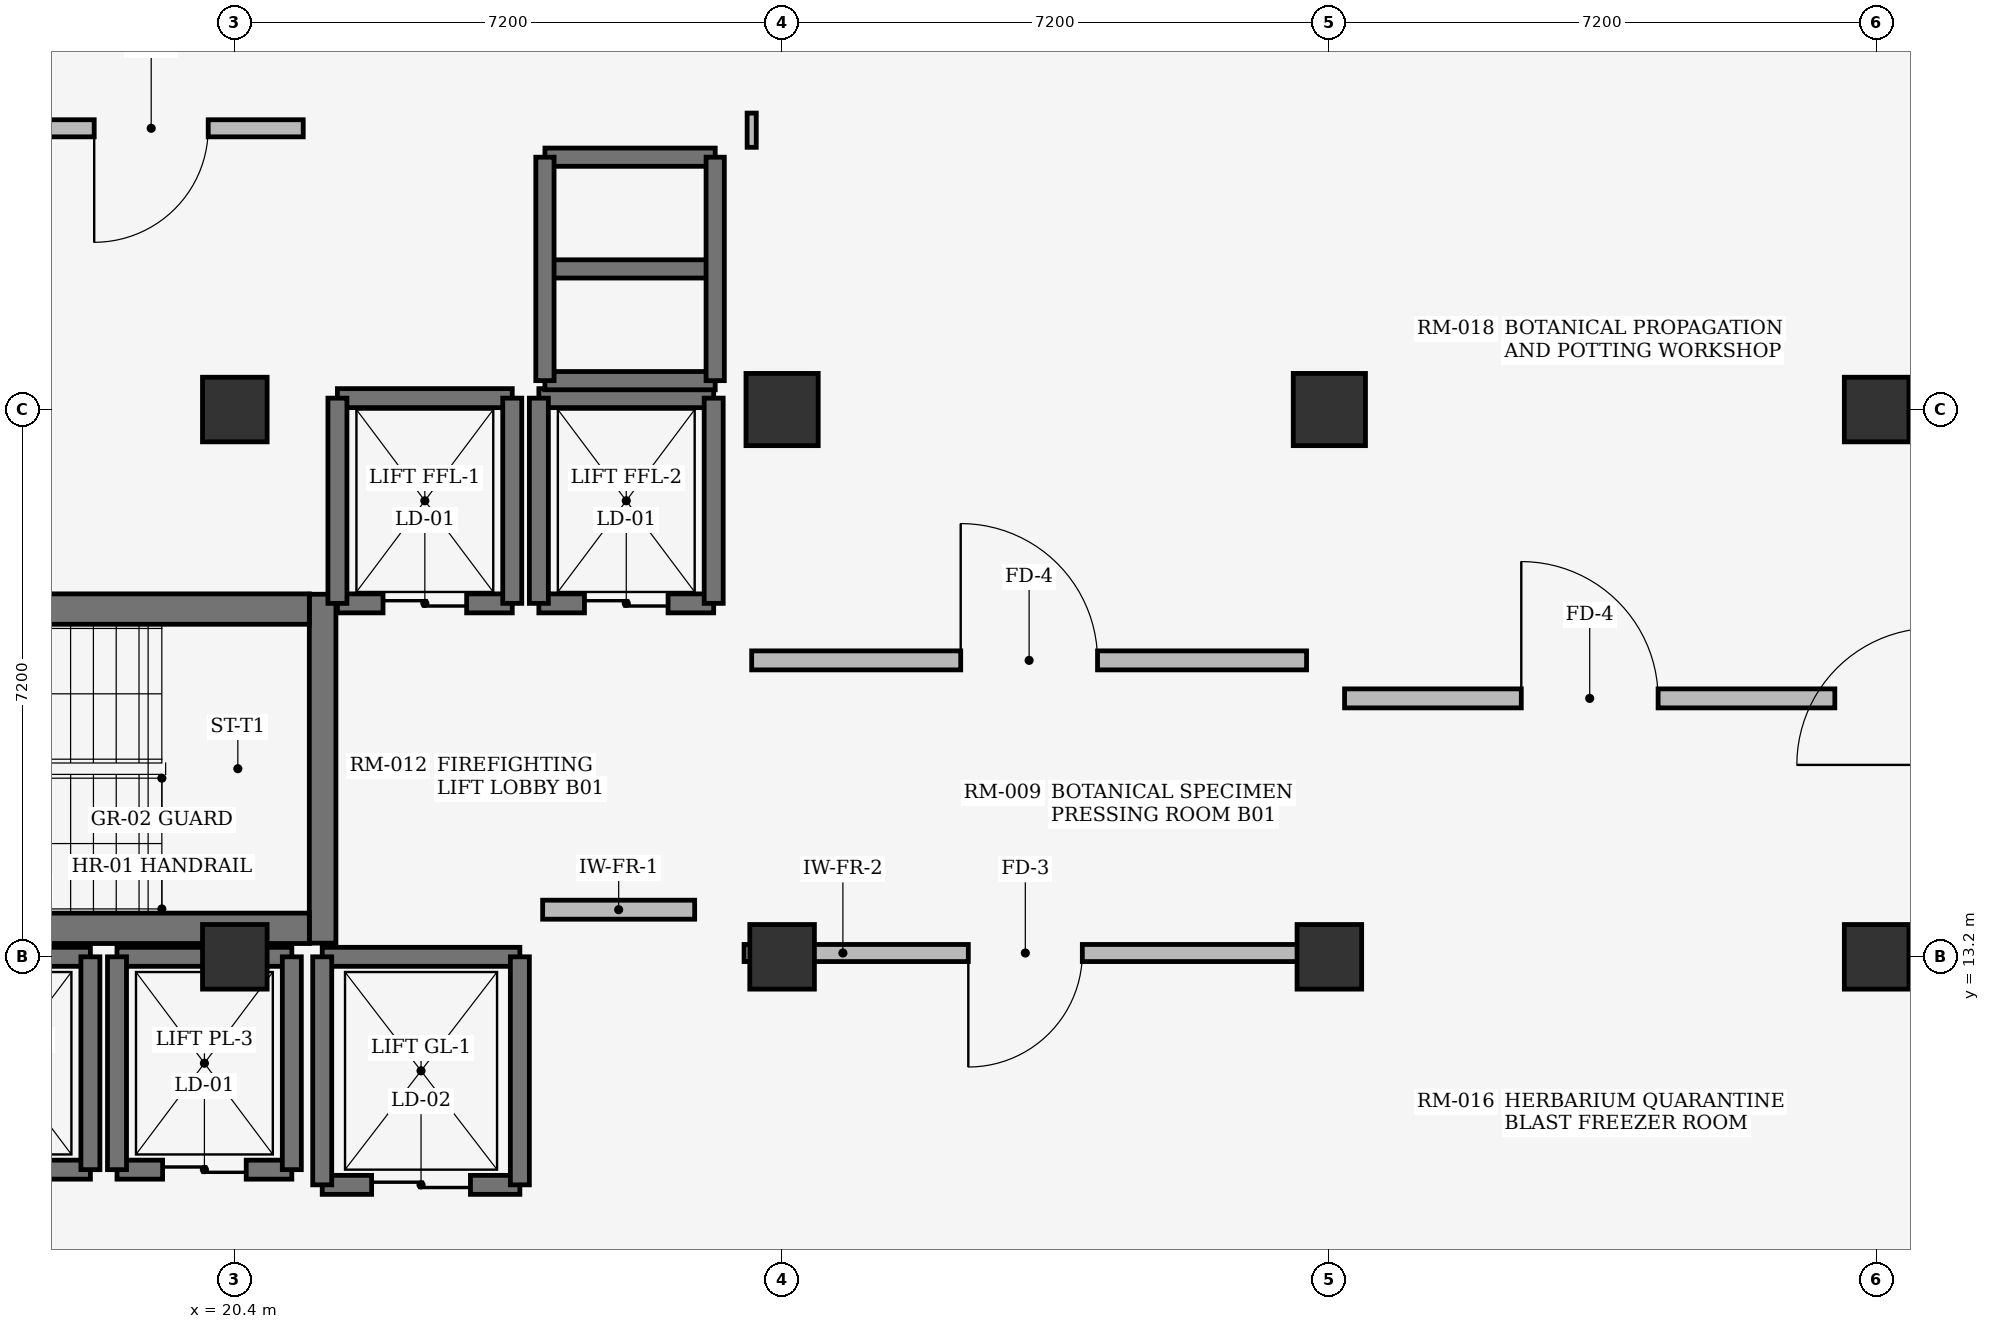
"""IFC4 building model, lengths in metres.
Left out: names, types, materials, properties, quantities, classifications, styles, units other than length and angle.
Written with IfcOpenShell. Run it as: python <this file> out.ifc"""

import sys

from ifc_helpers import new_model, si_unit, direction, frame, frame_2d, origin, origin_2d, place, context, subcontext, project, spatial, rectangle, extrude, element, fill, save


model = new_model("IFC4")
c1 = context("Model", 3, precision=1e-05, world=origin(), true_north=direction((0.0, 1.0)))
c2 = subcontext(c1, "Body", "Model", "MODEL_VIEW")
j1 = project(units=[si_unit("LENGTHUNIT", "METRE"), si_unit("PLANEANGLEUNIT", "RADIAN")], contexts=[c1])
p1 = place(None, origin())
s1 = spatial("IfcSite", under=j1, at=p1, CompositionType="ELEMENT")
p2 = place(p1, origin())
s2 = spatial("IfcBuilding", under=s1, at=p2, CompositionType="ELEMENT")
p3 = place(p2, frame((0.0, 0.0, -4.8)))
s3 = spatial("IfcBuildingStorey", under=s2, at=p3, CompositionType="ELEMENT", Elevation=-4.8)
for number, where, z_axis, x_axis in (
    (1, (20.4, 13.2, 0.0), (0.0, 0.0, 1.0), (1.0, 0.0, 0.0)),
    (2, (20.4, 20.4, 0.0), (0.0, 0.0, 1.0), (1.0, 0.0, 0.0)),
    (3, (27.6, 13.2, 0.0), (0.0, 0.0, 1.0), (1.0, 0.0, 0.0)),
):
    element("IfcColumn", number, at=place(p3, frame(where, z_axis=z_axis, x_axis=x_axis)), inside=s3, PredefinedType="COLUMN", context=c2, shape_type="SweptSolid", body=[
        extrude(rectangle(XDim=0.85, YDim=0.85, at=origin_2d()), origin(), (0.0, 0.0, 1.0), 4.5),
    ])
p4 = place(p3, frame((27.6, 20.4, 0.0), z_axis=(0.0, 0.0, 1.0), x_axis=(1.0, 0.0, 0.0)))
e4 = element("IfcColumn", 4, at=p4, inside=s3, PredefinedType="COLUMN", context=c2, shape_type="SweptSolid", body=[
    extrude(rectangle(XDim=0.95, YDim=0.95, at=origin_2d()), origin(), (0.0, 0.0, 1.0), 4.5),
])
p5 = place(p3, frame((34.8, 13.2, 0.0), z_axis=(0.0, 0.0, 1.0), x_axis=(1.0, 0.0, 0.0)))
e5 = element("IfcColumn", 5, at=p5, inside=s3, PredefinedType="COLUMN", context=c2, shape_type="SweptSolid", body=[
    extrude(rectangle(XDim=0.85, YDim=0.85, at=origin_2d()), origin(), (0.0, 0.0, 1.0), 4.5),
])
p6 = place(p3, frame((34.8, 20.4, 0.0), z_axis=(0.0, 0.0, 1.0), x_axis=(1.0, 0.0, 0.0)))
e6 = element("IfcColumn", 6, at=p6, inside=s3, PredefinedType="COLUMN", context=c2, shape_type="SweptSolid", body=[
    extrude(rectangle(XDim=0.95, YDim=0.95, at=origin_2d()), origin(), (0.0, 0.0, 1.0), 4.5),
])
for number, where, z_axis, x_axis in (
    (7, (42.0, 13.2, 0.0), (0.0, 0.0, 1.0), (1.0, 0.0, 0.0)),
    (8, (42.0, 20.4, 0.0), (0.0, 0.0, 1.0), (1.0, 0.0, 0.0)),
):
    element("IfcColumn", number, at=place(p3, frame(where, z_axis=z_axis, x_axis=x_axis)), inside=s3, PredefinedType="COLUMN", context=c2, shape_type="SweptSolid", body=[
        extrude(rectangle(XDim=0.85, YDim=0.85, at=origin_2d()), origin(), (0.0, 0.0, 1.0), 4.5),
    ])
p7 = place(p3, frame((21.555, 13.38, 0.0), z_axis=(0.0, 0.0, 1.0), x_axis=(0.0, 1.0, 0.0)))
e9 = element("IfcWall", 9, at=p7, inside=s3, PredefinedType="SHEAR", context=c2, shape_type="SweptSolid", body=[
    extrude(rectangle(XDim=4.59, YDim=0.35, at=frame_2d((2.295, 0.0))), origin(), (0.0, 0.0, 1.0), 4.5),
])
for number, where, z_axis, x_axis in (
    (10, (13.4, 13.575, 0.0), (0.0, 0.0, 1.0), (1.0, 0.0, 0.0)),
    (11, (13.4, 17.775, 0.0), (0.0, 0.0, 1.0), (1.0, 0.0, 0.0)),
):
    element("IfcWall", number, at=place(p3, frame(where, z_axis=z_axis, x_axis=x_axis)), inside=s3, PredefinedType="SHEAR", context=c2, shape_type="SweptSolid", body=[
        extrude(rectangle(XDim=7.98, YDim=0.4, at=frame_2d((3.99, 0.0))), origin(), (0.0, 0.0, 1.0), 4.5),
    ])
p8 = place(p3, frame((21.75, 17.85, 0.0), z_axis=(0.0, 0.0, 1.0), x_axis=(1.0, 0.0, 0.0)))
e12 = element("IfcWall", 12, at=p8, inside=s3, PredefinedType="SHEAR", context=c2, shape_type="SweptSolid", body=[
    extrude(rectangle(XDim=2.3, YDim=0.25, at=frame_2d((1.15, 0.0))), origin(), (0.0, 0.0, 1.0), 4.5),
])
p9 = place(p8, frame((0.6, 0.0, 0.0)))
e13 = element("IfcOpeningElement", 13, at=p9, cuts=e12, PredefinedType="OPENING", context=c2, shape_type="SweptSolid", body=[
    extrude(rectangle(XDim=1.1, YDim=2.2, at=frame_2d((0.55, 1.1))), frame((0.0, 0.135, 0.0), z_axis=(0.0, -1.0, 0.0), x_axis=(1.0, 0.0, 0.0)), (0.0, 0.0, 1.0), 0.27),
])
p10 = place(p3, frame((21.75, 20.55, 0.0), z_axis=(0.0, 0.0, 1.0), x_axis=(1.0, 0.0, 0.0)))
e14 = element("IfcWall", 14, at=p10, inside=s3, PredefinedType="SHEAR", context=c2, shape_type="SweptSolid", body=[
    extrude(rectangle(XDim=2.3, YDim=0.25, at=frame_2d((1.15, 0.0))), origin(), (0.0, 0.0, 1.0), 4.5),
])
for number, where, z_axis, x_axis in (
    (15, (21.75, 17.85, 0.0), (0.0, 0.0, 1.0), (0.0, 1.0, 0.0)),
    (16, (24.05, 17.85, 0.0), (0.0, 0.0, 1.0), (0.0, 1.0, 0.0)),
):
    element("IfcWall", number, at=place(p3, frame(where, z_axis=z_axis, x_axis=x_axis)), inside=s3, PredefinedType="SHEAR", context=c2, shape_type="SweptSolid", body=[
        extrude(rectangle(XDim=2.7, YDim=0.25, at=frame_2d((1.35, 0.0))), origin(), (0.0, 0.0, 1.0), 4.5),
    ])
p11 = place(p3, frame((24.4, 17.85, 0.0), z_axis=(0.0, 0.0, 1.0), x_axis=(1.0, 0.0, 0.0)))
e17 = element("IfcWall", 17, at=p11, inside=s3, PredefinedType="SHEAR", context=c2, shape_type="SweptSolid", body=[
    extrude(rectangle(XDim=2.3, YDim=0.25, at=frame_2d((1.15, 0.0))), origin(), (0.0, 0.0, 1.0), 4.5),
])
p12 = place(p11, frame((0.6, 0.0, 0.0)))
e18 = element("IfcOpeningElement", 18, at=p12, cuts=e17, PredefinedType="OPENING", context=c2, shape_type="SweptSolid", body=[
    extrude(rectangle(XDim=1.1, YDim=2.2, at=frame_2d((0.55, 1.1))), frame((0.0, 0.135, 0.0), z_axis=(0.0, -1.0, 0.0), x_axis=(1.0, 0.0, 0.0)), (0.0, 0.0, 1.0), 0.27),
])
p13 = place(p3, frame((24.4, 20.55, 0.0), z_axis=(0.0, 0.0, 1.0), x_axis=(1.0, 0.0, 0.0)))
e19 = element("IfcWall", 19, at=p13, inside=s3, PredefinedType="SHEAR", context=c2, shape_type="SweptSolid", body=[
    extrude(rectangle(XDim=2.3, YDim=0.25, at=frame_2d((1.15, 0.0))), origin(), (0.0, 0.0, 1.0), 4.5),
])
for number, where, z_axis, x_axis in (
    (20, (24.4, 17.85, 0.0), (0.0, 0.0, 1.0), (0.0, 1.0, 0.0)),
    (21, (26.7, 17.85, 0.0), (0.0, 0.0, 1.0), (0.0, 1.0, 0.0)),
):
    element("IfcWall", number, at=place(p3, frame(where, z_axis=z_axis, x_axis=x_axis)), inside=s3, PredefinedType="SHEAR", context=c2, shape_type="SweptSolid", body=[
        extrude(rectangle(XDim=2.7, YDim=0.25, at=frame_2d((1.35, 0.0))), origin(), (0.0, 0.0, 1.0), 4.5),
    ])
p14 = place(p3, frame((16.2, 10.4, 0.0), z_axis=(0.0, 0.0, 1.0), x_axis=(1.0, 0.0, 0.0)))
e22 = element("IfcWall", 22, at=p14, inside=s3, PredefinedType="SHEAR", context=c2, shape_type="SweptSolid", body=[
    extrude(rectangle(XDim=2.3, YDim=0.25, at=frame_2d((1.15, 0.0))), origin(), (0.0, 0.0, 1.0), 4.5),
])
p15 = place(p14, frame((0.6, 0.0, 0.0)))
e23 = element("IfcOpeningElement", 23, at=p15, cuts=e22, PredefinedType="OPENING", context=c2, shape_type="SweptSolid", body=[
    extrude(rectangle(XDim=1.1, YDim=2.2, at=frame_2d((0.55, 1.1))), frame((0.0, 0.135, 0.0), z_axis=(0.0, -1.0, 0.0), x_axis=(1.0, 0.0, 0.0)), (0.0, 0.0, 1.0), 0.27),
])
p16 = place(p3, frame((16.2, 13.2, 0.0), z_axis=(0.0, 0.0, 1.0), x_axis=(1.0, 0.0, 0.0)))
e24 = element("IfcWall", 24, at=p16, inside=s3, PredefinedType="SHEAR", context=c2, shape_type="SweptSolid", body=[
    extrude(rectangle(XDim=2.3, YDim=0.25, at=frame_2d((1.15, 0.0))), origin(), (0.0, 0.0, 1.0), 4.5),
])
p17 = place(p3, frame((18.5, 10.4, 0.0), z_axis=(0.0, 0.0, 1.0), x_axis=(0.0, 1.0, 0.0)))
e25 = element("IfcWall", 25, at=p17, inside=s3, PredefinedType="SHEAR", context=c2, shape_type="SweptSolid", body=[
    extrude(rectangle(XDim=2.8, YDim=0.25, at=frame_2d((1.4, 0.0))), origin(), (0.0, 0.0, 1.0), 4.5),
])
p18 = place(p3, frame((18.85, 10.4, 0.0), z_axis=(0.0, 0.0, 1.0), x_axis=(1.0, 0.0, 0.0)))
e26 = element("IfcWall", 26, at=p18, inside=s3, PredefinedType="SHEAR", context=c2, shape_type="SweptSolid", body=[
    extrude(rectangle(XDim=2.3, YDim=0.25, at=frame_2d((1.15, 0.0))), origin(), (0.0, 0.0, 1.0), 4.5),
])
p19 = place(p18, frame((0.6, 0.0, 0.0)))
e27 = element("IfcOpeningElement", 27, at=p19, cuts=e26, PredefinedType="OPENING", context=c2, shape_type="SweptSolid", body=[
    extrude(rectangle(XDim=1.1, YDim=2.2, at=frame_2d((0.55, 1.1))), frame((0.0, 0.135, 0.0), z_axis=(0.0, -1.0, 0.0), x_axis=(1.0, 0.0, 0.0)), (0.0, 0.0, 1.0), 0.27),
])
p20 = place(p3, frame((18.85, 13.2, 0.0), z_axis=(0.0, 0.0, 1.0), x_axis=(1.0, 0.0, 0.0)))
e28 = element("IfcWall", 28, at=p20, inside=s3, PredefinedType="SHEAR", context=c2, shape_type="SweptSolid", body=[
    extrude(rectangle(XDim=2.3, YDim=0.25, at=frame_2d((1.15, 0.0))), origin(), (0.0, 0.0, 1.0), 4.5),
])
for number, where, z_axis, x_axis in (
    (29, (18.85, 10.4, 0.0), (0.0, 0.0, 1.0), (0.0, 1.0, 0.0)),
    (30, (21.15, 10.4, 0.0), (0.0, 0.0, 1.0), (0.0, 1.0, 0.0)),
):
    element("IfcWall", number, at=place(p3, frame(where, z_axis=z_axis, x_axis=x_axis)), inside=s3, PredefinedType="SHEAR", context=c2, shape_type="SweptSolid", body=[
        extrude(rectangle(XDim=2.8, YDim=0.25, at=frame_2d((1.4, 0.0))), origin(), (0.0, 0.0, 1.0), 4.5),
    ])
p21 = place(p3, frame((21.55, 10.2, 0.0), z_axis=(0.0, 0.0, 1.0), x_axis=(1.0, 0.0, 0.0)))
e31 = element("IfcWall", 31, at=p21, inside=s3, PredefinedType="SHEAR", context=c2, shape_type="SweptSolid", body=[
    extrude(rectangle(XDim=2.6, YDim=0.25, at=frame_2d((1.3, 0.0))), origin(), (0.0, 0.0, 1.0), 4.5),
])
p22 = place(p21, frame((0.65, 0.0, 0.0)))
e32 = element("IfcOpeningElement", 32, at=p22, cuts=e31, PredefinedType="OPENING", context=c2, shape_type="SweptSolid", body=[
    extrude(rectangle(XDim=1.3, YDim=2.25, at=frame_2d((0.65, 1.125))), frame((0.0, 0.135, 0.0), z_axis=(0.0, -1.0, 0.0), x_axis=(1.0, 0.0, 0.0)), (0.0, 0.0, 1.0), 0.27),
])
p23 = place(p3, frame((21.55, 13.2, 0.0), z_axis=(0.0, 0.0, 1.0), x_axis=(1.0, 0.0, 0.0)))
e33 = element("IfcWall", 33, at=p23, inside=s3, PredefinedType="SHEAR", context=c2, shape_type="SweptSolid", body=[
    extrude(rectangle(XDim=2.6, YDim=0.25, at=frame_2d((1.3, 0.0))), origin(), (0.0, 0.0, 1.0), 4.5),
])
for number, where, z_axis, x_axis in (
    (34, (21.55, 10.2, 0.0), (0.0, 0.0, 1.0), (0.0, 1.0, 0.0)),
    (35, (24.15, 10.2, 0.0), (0.0, 0.0, 1.0), (0.0, 1.0, 0.0)),
):
    element("IfcWall", number, at=place(p3, frame(where, z_axis=z_axis, x_axis=x_axis)), inside=s3, PredefinedType="SHEAR", context=c2, shape_type="SweptSolid", body=[
        extrude(rectangle(XDim=3.0, YDim=0.25, at=frame_2d((1.5, 0.0))), origin(), (0.0, 0.0, 1.0), 4.5),
    ])
for number, where, z_axis, x_axis in (
    (36, (24.48, 20.78, 0.0), (0.0, 0.0, 1.0), (1.0, 0.0, 0.0)),
    (37, (24.48, 22.25, 0.0), (0.0, 0.0, 1.0), (1.0, 0.0, 0.0)),
    (38, (24.48, 23.72, 0.0), (0.0, 0.0, 1.0), (1.0, 0.0, 0.0)),
):
    element("IfcWall", number, at=place(p3, frame(where, z_axis=z_axis, x_axis=x_axis)), inside=s3, PredefinedType="SHEAR", context=c2, shape_type="SweptSolid", body=[
        extrude(rectangle(XDim=2.24, YDim=0.24, at=frame_2d((1.12, 0.0))), origin(), (0.0, 0.0, 1.0), 4.5),
    ])
for number, where, z_axis, x_axis in (
    (39, (24.48, 20.78, 0.0), (0.0, 0.0, 1.0), (0.0, 1.0, 0.0)),
    (40, (26.72, 20.78, 0.0), (0.0, 0.0, 1.0), (0.0, 1.0, 0.0)),
):
    element("IfcWall", number, at=place(p3, frame(where, z_axis=z_axis, x_axis=x_axis)), inside=s3, PredefinedType="SHEAR", context=c2, shape_type="SweptSolid", body=[
        extrude(rectangle(XDim=2.94, YDim=0.24, at=frame_2d((1.47, 0.0))), origin(), (0.0, 0.0, 1.0), 4.5),
    ])
p24 = place(p3, frame((24.45, 13.82, 0.0), z_axis=(0.0, 0.0, 1.0), x_axis=(1.0, 0.0, 0.0)))
e41 = element("IfcWall", 41, at=p24, inside=s3, PredefinedType="SOLIDWALL", context=c2, shape_type="SweptSolid", body=[
    extrude(rectangle(XDim=2.0, YDim=0.25, at=frame_2d((1.0, 0.0))), origin(), (0.0, 0.0, 1.0), 4.48),
])
p25 = place(p3, frame((27.1, 13.25, 0.0), z_axis=(0.0, 0.0, 1.0), x_axis=(1.0, 0.0, 0.0)))
e42 = element("IfcWall", 42, at=p25, inside=s3, PredefinedType="SOLIDWALL", context=c2, shape_type="SweptSolid", body=[
    extrude(rectangle(XDim=7.4, YDim=0.225, at=frame_2d((3.7, 0.0))), origin(), (0.0, 0.0, 1.0), 3.89),
])
p26 = place(p25, frame((2.95, 0.0, 0.0)))
e43 = element("IfcOpeningElement", 43, at=p26, cuts=e42, PredefinedType="OPENING", context=c2, shape_type="SweptSolid", body=[
    extrude(rectangle(XDim=1.5, YDim=2.2, at=frame_2d((0.75, 1.1))), frame((0.0, 0.123, 0.0), z_axis=(0.0, -1.0, 0.0), x_axis=(1.0, 0.0, 0.0)), (0.0, 0.0, 1.0), 0.245),
])
p27 = place(p3, frame((35.0, 16.6, 0.0), z_axis=(0.0, 0.0, 1.0), x_axis=(1.0, 0.0, 0.0)))
e44 = element("IfcWall", 44, at=p27, inside=s3, PredefinedType="SOLIDWALL", context=c2, shape_type="SweptSolid", body=[
    extrude(rectangle(XDim=6.45, YDim=0.25, at=frame_2d((3.225, 0.0))), origin(), (0.0, 0.0, 1.0), 4.48),
])
p28 = place(p27, frame((2.325, 0.0, 0.0)))
e45 = element("IfcOpeningElement", 45, at=p28, cuts=e44, PredefinedType="OPENING", context=c2, shape_type="SweptSolid", body=[
    extrude(rectangle(XDim=1.8, YDim=2.25, at=frame_2d((0.9, 1.125))), frame((0.0, 0.135, 0.0), z_axis=(0.0, -1.0, 0.0), x_axis=(1.0, 0.0, 0.0)), (0.0, 0.0, 1.0), 0.27),
])
p29 = place(p3, frame((27.2, 24.3, 0.0), z_axis=(0.0, 0.0, 1.0), x_axis=(0.0, -1.0, 0.0)))
e46 = element("IfcWall", 46, at=p29, inside=s3, PredefinedType="PARTITIONING", context=c2, shape_type="SweptSolid", body=[
    extrude(rectangle(XDim=0.45, YDim=0.12, at=frame_2d((0.225, 0.0))), origin(), (0.0, 0.0, 1.0), 4.48),
])
p30 = place(p3, frame((17.3, 24.1, 0.0), z_axis=(0.0, 0.0, 1.0), x_axis=(1.0, 0.0, 0.0)))
e47 = element("IfcWall", 47, at=p30, inside=s3, PredefinedType="SOLIDWALL", context=c2, shape_type="SweptSolid", body=[
    extrude(rectangle(XDim=4.0, YDim=0.225, at=frame_2d((2.0, 0.0))), origin(), (0.0, 0.0, 1.0), 4.48),
])
p31 = place(p30, frame((1.25, 0.0, 0.0)))
e48 = element("IfcOpeningElement", 48, at=p31, cuts=e47, PredefinedType="OPENING", context=c2, shape_type="SweptSolid", body=[
    extrude(rectangle(XDim=1.5, YDim=2.2, at=frame_2d((0.75, 1.1))), frame((0.0, 0.123, 0.0), z_axis=(0.0, -1.0, 0.0), x_axis=(1.0, 0.0, 0.0)), (0.0, 0.0, 1.0), 0.245),
])
p32 = place(p3, frame((27.2, 17.1, 0.0), z_axis=(0.0, 0.0, 1.0), x_axis=(1.0, 0.0, 0.0)))
e49 = element("IfcWall", 49, at=p32, inside=s3, PredefinedType="SOLIDWALL", context=c2, shape_type="SweptSolid", body=[
    extrude(rectangle(XDim=7.3, YDim=0.25, at=frame_2d((3.65, 0.0))), origin(), (0.0, 0.0, 1.0), 4.48),
])
p33 = place(p32, frame((2.75, 0.0, 0.0)))
e50 = element("IfcOpeningElement", 50, at=p33, cuts=e49, PredefinedType="OPENING", context=c2, shape_type="SweptSolid", body=[
    extrude(rectangle(XDim=1.8, YDim=2.25, at=frame_2d((0.9, 1.125))), frame((0.0, 0.135, 0.0), z_axis=(0.0, -1.0, 0.0), x_axis=(1.0, 0.0, 0.0)), (0.0, 0.0, 1.0), 0.27),
])
p34 = place(p9, origin())
e51 = element("IfcDoor", 51, at=p34, inside=s3, OperationType="DOUBLE_DOOR_SLIDING", PredefinedType="DOOR", context=c2, shape_type="SweptSolid", body=[
    extrude(rectangle(XDim=1.1, YDim=2.2, at=frame_2d((0.55, 1.1))), frame((0.0, 0.025, 0.0), z_axis=(0.0, -1.0, 0.0), x_axis=(1.0, 0.0, 0.0)), (0.0, 0.0, 1.0), 0.05),
])
fill(e13, e51)
p35 = place(p12, origin())
e52 = element("IfcDoor", 52, at=p35, inside=s3, OperationType="DOUBLE_DOOR_SLIDING", PredefinedType="DOOR", context=c2, shape_type="SweptSolid", body=[
    extrude(rectangle(XDim=1.1, YDim=2.2, at=frame_2d((0.55, 1.1))), frame((0.0, 0.025, 0.0), z_axis=(0.0, -1.0, 0.0), x_axis=(1.0, 0.0, 0.0)), (0.0, 0.0, 1.0), 0.05),
])
fill(e18, e52)
p36 = place(p19, origin())
e53 = element("IfcDoor", 53, at=p36, inside=s3, OperationType="DOUBLE_DOOR_SLIDING", PredefinedType="DOOR", context=c2, shape_type="SweptSolid", body=[
    extrude(rectangle(XDim=1.1, YDim=2.2, at=frame_2d((0.55, 1.1))), frame((0.0, 0.025, 0.0), z_axis=(0.0, -1.0, 0.0), x_axis=(1.0, 0.0, 0.0)), (0.0, 0.0, 1.0), 0.05),
])
fill(e27, e53)
p37 = place(p22, origin())
e54 = element("IfcDoor", 54, at=p37, inside=s3, OperationType="DOUBLE_DOOR_SLIDING", PredefinedType="DOOR", context=c2, shape_type="SweptSolid", body=[
    extrude(rectangle(XDim=1.3, YDim=2.25, at=frame_2d((0.65, 1.125))), frame((0.0, 0.025, 0.0), z_axis=(0.0, -1.0, 0.0), x_axis=(1.0, 0.0, 0.0)), (0.0, 0.0, 1.0), 0.05),
])
fill(e32, e54)
p38 = place(p26, frame((1.5, 0.0, 0.0), z_axis=(0.0, 0.0, 1.0), x_axis=(-1.0, 0.0, 0.0)))
e55 = element("IfcDoor", 55, at=p38, inside=s3, OperationType="SINGLE_SWING_LEFT", PredefinedType="DOOR", context=c2, shape_type="SweptSolid", body=[
    extrude(rectangle(XDim=1.5, YDim=2.2, at=frame_2d((0.75, 1.1))), frame((0.0, 0.025, 0.0), z_axis=(0.0, -1.0, 0.0), x_axis=(1.0, 0.0, 0.0)), (0.0, 0.0, 1.0), 0.05),
])
fill(e43, e55)
p39 = place(p28, origin())
e56 = element("IfcDoor", 56, at=p39, inside=s3, OperationType="DOUBLE_DOOR_SINGLE_SWING", PredefinedType="DOOR", context=c2, shape_type="SweptSolid", body=[
    extrude(rectangle(XDim=1.8, YDim=2.25, at=frame_2d((0.9, 1.125))), frame((0.0, 0.025, 0.0), z_axis=(0.0, -1.0, 0.0), x_axis=(1.0, 0.0, 0.0)), (0.0, 0.0, 1.0), 0.05),
])
fill(e45, e56)
p40 = place(p31, frame((1.5, 0.0, 0.0), z_axis=(0.0, 0.0, 1.0), x_axis=(-1.0, 0.0, 0.0)))
e57 = element("IfcDoor", 57, at=p40, inside=s3, OperationType="SINGLE_SWING_LEFT", PredefinedType="DOOR", context=c2, shape_type="SweptSolid", body=[
    extrude(rectangle(XDim=1.5, YDim=2.2, at=frame_2d((0.75, 1.1))), frame((0.0, 0.025, 0.0), z_axis=(0.0, -1.0, 0.0), x_axis=(1.0, 0.0, 0.0)), (0.0, 0.0, 1.0), 0.05),
])
fill(e48, e57)
p41 = place(p33, origin())
e58 = element("IfcDoor", 58, at=p41, inside=s3, OperationType="DOUBLE_DOOR_SINGLE_SWING", PredefinedType="DOOR", context=c2, shape_type="SweptSolid", body=[
    extrude(rectangle(XDim=1.8, YDim=2.25, at=frame_2d((0.9, 1.125))), frame((0.0, 0.025, 0.0), z_axis=(0.0, -1.0, 0.0), x_axis=(1.0, 0.0, 0.0)), (0.0, 0.0, 1.0), 0.05),
])
fill(e50, e58)
save(model, sys.argv[1])
